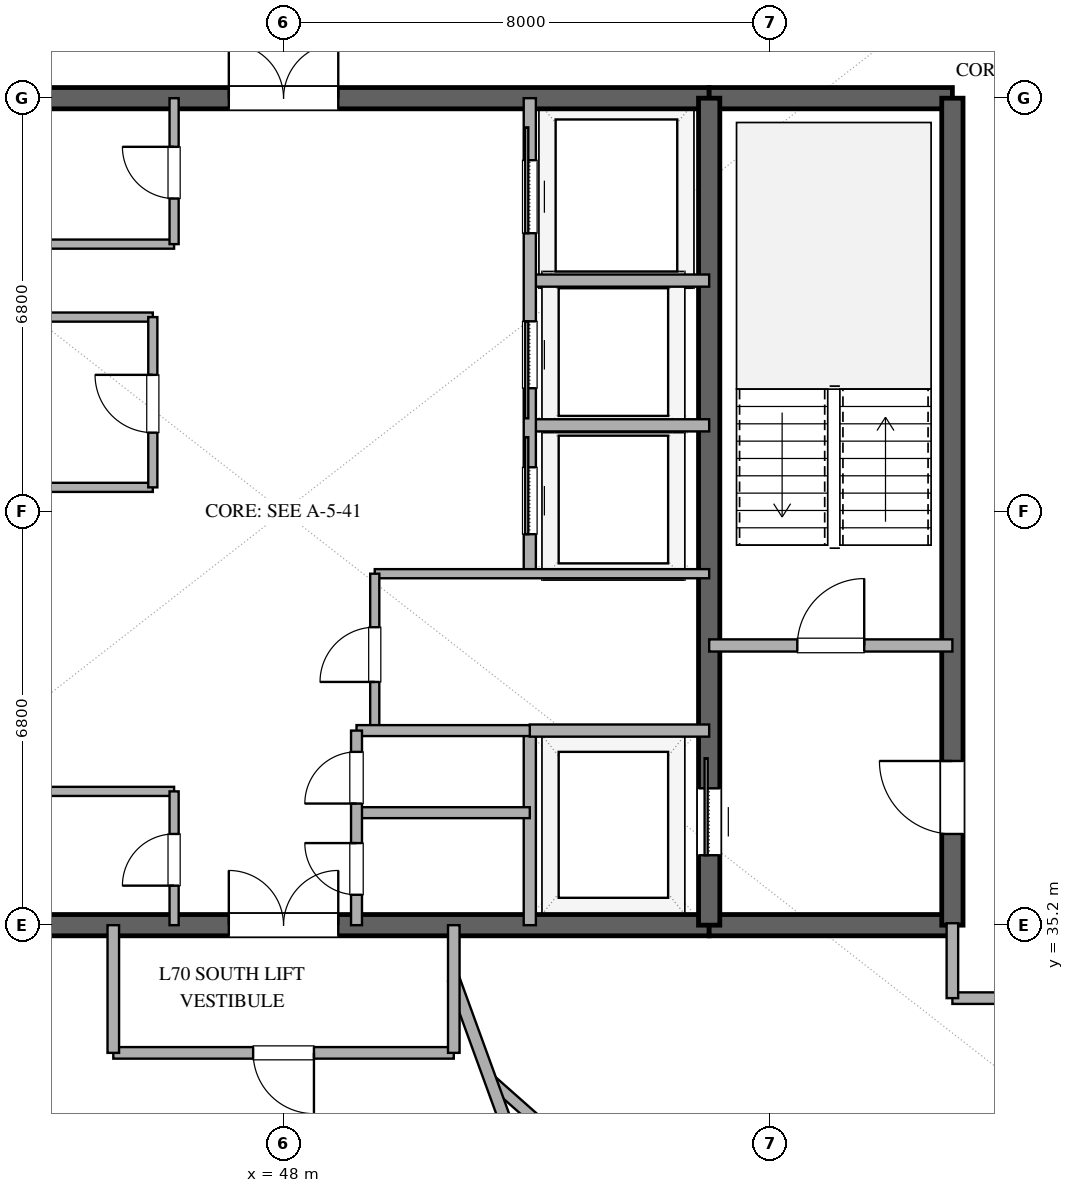
"""IFC4 building model, lengths in metres.
Left out: names, types, materials, properties, quantities, classifications, styles, units other than length and angle.
Written with IfcOpenShell. Run it as: python <this file> out.ifc"""

import sys

from ifc_helpers import new_model, si_unit, direction, frame, frame_2d, origin, place, context, subcontext, project, spatial, rectangle, extrude, element, fill, save


model = new_model("IFC4")
c1 = context("Model", 3, precision=1e-05, world=origin(), true_north=direction((0.0, 1.0)))
c2 = subcontext(c1, "Body", "Model", "MODEL_VIEW")
j1 = project(units=[si_unit("LENGTHUNIT", "METRE"), si_unit("PLANEANGLEUNIT", "RADIAN")], contexts=[c1])
p1 = place(None, origin())
s1 = spatial("IfcSite", under=j1, at=p1, CompositionType="ELEMENT")
p2 = place(p1, origin())
s2 = spatial("IfcBuilding", under=s1, at=p2, CompositionType="ELEMENT")
p3 = place(p2, frame((0.0, 0.0, 273.0)))
s3 = spatial("IfcBuildingStorey", under=s2, at=p3, CompositionType="ELEMENT", Elevation=273.0)
p4 = place(p3, frame((41.0, 35.2, 0.0), z_axis=(0.0, 0.0, 1.0), x_axis=(1.0, 0.0, 0.0)))
e1 = element("IfcWall", 1, at=p4, inside=s3, PredefinedType="SHEAR", context=c2, shape_type="SweptSolid", body=[
    extrude(rectangle(XDim=14.0, YDim=0.35, at=frame_2d((7.0, 0.0))), origin(), (0.0, 0.0, 1.0), 3.37),
])
p5 = place(p4, frame((6.1, 0.0, 0.0)))
e2 = element("IfcOpeningElement", 2, at=p5, cuts=e1, PredefinedType="OPENING", context=c2, shape_type="SweptSolid", body=[
    extrude(rectangle(XDim=1.8, YDim=2.25, at=frame_2d((0.9, 1.125))), frame((0.0, 0.185, 0.0), z_axis=(0.0, -1.0, 0.0), x_axis=(1.0, 0.0, 0.0)), (0.0, 0.0, 1.0), 0.37),
])
p6 = place(p3, frame((55.0, 35.2, 0.0), z_axis=(0.0, 0.0, 1.0), x_axis=(1.0, 0.0, 0.0)))
e3 = element("IfcWall", 3, at=p6, inside=s3, PredefinedType="SHEAR", context=c2, shape_type="SweptSolid", body=[
    extrude(rectangle(XDim=4.0, YDim=0.35, at=frame_2d((2.0, 0.0))), origin(), (0.0, 0.0, 1.0), 3.37),
])
p7 = place(p3, frame((41.0, 48.8, 0.0), z_axis=(0.0, 0.0, 1.0), x_axis=(1.0, 0.0, 0.0)))
e4 = element("IfcWall", 4, at=p7, inside=s3, PredefinedType="SHEAR", context=c2, shape_type="SweptSolid", body=[
    extrude(rectangle(XDim=14.0, YDim=0.35, at=frame_2d((7.0, 0.0))), origin(), (0.0, 0.0, 1.0), 3.37),
])
p8 = place(p7, frame((6.1, 0.0, 0.0)))
e5 = element("IfcOpeningElement", 5, at=p8, cuts=e4, PredefinedType="OPENING", context=c2, shape_type="SweptSolid", body=[
    extrude(rectangle(XDim=1.8, YDim=2.25, at=frame_2d((0.9, 1.125))), frame((0.0, 0.185, 0.0), z_axis=(0.0, -1.0, 0.0), x_axis=(1.0, 0.0, 0.0)), (0.0, 0.0, 1.0), 0.37),
])
p9 = place(p3, frame((55.0, 48.8, 0.0), z_axis=(0.0, 0.0, 1.0), x_axis=(1.0, 0.0, 0.0)))
e6 = element("IfcWall", 6, at=p9, inside=s3, PredefinedType="SHEAR", context=c2, shape_type="SweptSolid", body=[
    extrude(rectangle(XDim=4.0, YDim=0.35, at=frame_2d((2.0, 0.0))), origin(), (0.0, 0.0, 1.0), 3.37),
])
p10 = place(p3, frame((59.0, 35.2, 0.0), z_axis=(0.0, 0.0, 1.0), x_axis=(0.0, 1.0, 0.0)))
e7 = element("IfcWall", 7, at=p10, inside=s3, PredefinedType="SHEAR", context=c2, shape_type="SweptSolid", body=[
    extrude(rectangle(XDim=13.6, YDim=0.35, at=frame_2d((6.8, 0.0))), origin(), (0.0, 0.0, 1.0), 3.37),
])
p11 = place(p10, frame((1.5, 0.0, 0.0)))
e8 = element("IfcOpeningElement", 8, at=p11, cuts=e7, PredefinedType="OPENING", context=c2, shape_type="SweptSolid", body=[
    extrude(rectangle(XDim=1.2, YDim=2.15, at=frame_2d((0.6, 1.075))), frame((0.0, 0.185, 0.0), z_axis=(0.0, -1.0, 0.0), x_axis=(1.0, 0.0, 0.0)), (0.0, 0.0, 1.0), 0.37),
])
p12 = place(p3, frame((55.0, 35.2, 0.0), z_axis=(0.0, 0.0, 1.0), x_axis=(0.0, 1.0, 0.0)))
e9 = element("IfcWall", 9, at=p12, inside=s3, PredefinedType="SHEAR", context=c2, shape_type="SweptSolid", body=[
    extrude(rectangle(XDim=13.6, YDim=0.35, at=frame_2d((6.8, 0.0))), origin(), (0.0, 0.0, 1.0), 3.37),
])
p13 = place(p12, frame((1.15, 0.0, 0.0)))
e10 = element("IfcOpeningElement", 10, at=p13, cuts=e9, PredefinedType="OPENING", context=c2, shape_type="SweptSolid", body=[
    extrude(rectangle(XDim=1.1, YDim=2.2, at=frame_2d((0.55, 1.1))), frame((0.0, 0.185, 0.0), z_axis=(0.0, -1.0, 0.0), x_axis=(1.0, 0.0, 0.0)), (0.0, 0.0, 1.0), 0.37),
])
p14 = place(p3, frame((55.0, 39.8, 0.0), z_axis=(0.0, 0.0, 1.0), x_axis=(1.0, 0.0, 0.0)))
e11 = element("IfcWall", 11, at=p14, inside=s3, PredefinedType="SOLIDWALL", context=c2, shape_type="SweptSolid", body=[
    extrude(rectangle(XDim=4.0, YDim=0.2, at=frame_2d((2.0, 0.0))), origin(), (0.0, 0.0, 1.0), 2.73),
])
p15 = place(p14, frame((1.45, 0.0, 0.0)))
e12 = element("IfcOpeningElement", 12, at=p15, cuts=e11, PredefinedType="OPENING", context=c2, shape_type="SweptSolid", body=[
    extrude(rectangle(XDim=1.1, YDim=2.15, at=frame_2d((0.55, 1.075))), frame((0.0, 0.11, 0.0), z_axis=(0.0, -1.0, 0.0), x_axis=(1.0, 0.0, 0.0)), (0.0, 0.0, 1.0), 0.22),
])
p16 = place(p3, frame((52.05, 35.2, 0.0), z_axis=(0.0, 0.0, 1.0), x_axis=(0.0, 1.0, 0.0)))
e13 = element("IfcWall", 13, at=p16, inside=s3, PredefinedType="SOLIDWALL", context=c2, shape_type="SweptSolid", body=[
    extrude(rectangle(XDim=3.2, YDim=0.2, at=frame_2d((1.6, 0.0))), origin(), (0.0, 0.0, 1.0), 2.73),
])
p17 = place(p3, frame((52.05, 38.4, 0.0), z_axis=(0.0, 0.0, 1.0), x_axis=(1.0, 0.0, 0.0)))
e14 = element("IfcWall", 14, at=p17, inside=s3, PredefinedType="SOLIDWALL", context=c2, shape_type="SweptSolid", body=[
    extrude(rectangle(XDim=2.95, YDim=0.2, at=frame_2d((1.475, 0.0))), origin(), (0.0, 0.0, 1.0), 2.73),
])
for number, where, z_axis, x_axis in (
    (15, (41.0, 42.4, 0.0), (0.0, 0.0, 1.0), (1.0, 0.0, 0.0)),
    (16, (41.0, 45.2, 0.0), (0.0, 0.0, 1.0), (1.0, 0.0, 0.0)),
):
    element("IfcWall", number, at=place(p3, frame(where, z_axis=z_axis, x_axis=x_axis)), inside=s3, PredefinedType="PARTITIONING", context=c2, shape_type="SweptSolid", body=[
        extrude(rectangle(XDim=4.85, YDim=0.15, at=frame_2d((2.425, 0.0))), origin(), (0.0, 0.0, 1.0), 2.73),
    ])
p18 = place(p3, frame((45.85, 42.4, 0.0), z_axis=(0.0, 0.0, 1.0), x_axis=(0.0, 1.0, 0.0)))
e17 = element("IfcWall", 17, at=p18, inside=s3, PredefinedType="PARTITIONING", context=c2, shape_type="SweptSolid", body=[
    extrude(rectangle(XDim=2.8, YDim=0.15, at=frame_2d((1.4, 0.0))), origin(), (0.0, 0.0, 1.0), 2.73),
])
p19 = place(p18, frame((0.9, 0.0, 0.0)))
e18 = element("IfcOpeningElement", 18, at=p19, cuts=e17, PredefinedType="OPENING", context=c2, shape_type="SweptSolid", body=[
    extrude(rectangle(XDim=0.95, YDim=2.15, at=frame_2d((0.475, 1.075))), frame((0.0, 0.085, 0.0), z_axis=(0.0, -1.0, 0.0), x_axis=(1.0, 0.0, 0.0)), (0.0, 0.0, 1.0), 0.17),
])
for number, where, z_axis, x_axis in (
    (19, (52.05, 43.42, 0.0), (0.0, 0.0, 1.0), (1.0, 0.0, 0.0)),
    (20, (52.05, 45.8, 0.0), (0.0, 0.0, 1.0), (1.0, 0.0, 0.0)),
):
    element("IfcWall", number, at=place(p3, frame(where, z_axis=z_axis, x_axis=x_axis)), inside=s3, PredefinedType="SOLIDWALL", context=c2, shape_type="SweptSolid", body=[
        extrude(rectangle(XDim=2.95, YDim=0.2, at=frame_2d((1.475, 0.0))), origin(), (0.0, 0.0, 1.0), 2.73),
    ])
p20 = place(p3, frame((52.05, 40.98, 0.0), z_axis=(0.0, 0.0, 1.0), x_axis=(0.0, 1.0, 0.0)))
e21 = element("IfcWall", 21, at=p20, inside=s3, PredefinedType="SOLIDWALL", context=c2, shape_type="SweptSolid", body=[
    extrude(rectangle(XDim=7.82, YDim=0.2, at=frame_2d((3.91, 0.0))), origin(), (0.0, 0.0, 1.0), 2.73),
])
p21 = place(p20, frame((0.65, 0.0, 0.0)))
e22 = element("IfcOpeningElement", 22, at=p21, cuts=e21, PredefinedType="OPENING", context=c2, shape_type="SweptSolid", body=[
    extrude(rectangle(XDim=1.1, YDim=2.2, at=frame_2d((0.55, 1.1))), frame((0.0, 0.11, 0.0), z_axis=(0.0, -1.0, 0.0), x_axis=(1.0, 0.0, 0.0)), (0.0, 0.0, 1.0), 0.22),
])
p22 = place(p20, frame((3.05, 0.0, 0.0)))
e23 = element("IfcOpeningElement", 23, at=p22, cuts=e21, PredefinedType="OPENING", context=c2, shape_type="SweptSolid", body=[
    extrude(rectangle(XDim=1.1, YDim=2.2, at=frame_2d((0.55, 1.1))), frame((0.0, 0.11, 0.0), z_axis=(0.0, -1.0, 0.0), x_axis=(1.0, 0.0, 0.0)), (0.0, 0.0, 1.0), 0.22),
])
p23 = place(p20, frame((5.6, 0.0, 0.0)))
e24 = element("IfcOpeningElement", 24, at=p23, cuts=e21, PredefinedType="OPENING", context=c2, shape_type="SweptSolid", body=[
    extrude(rectangle(XDim=1.2, YDim=2.2, at=frame_2d((0.6, 1.1))), frame((0.0, 0.11, 0.0), z_axis=(0.0, -1.0, 0.0), x_axis=(1.0, 0.0, 0.0)), (0.0, 0.0, 1.0), 0.22),
])
p24 = place(p3, frame((49.5, 40.98, 0.0), z_axis=(0.0, 0.0, 1.0), x_axis=(1.0, 0.0, 0.0)))
e25 = element("IfcWall", 25, at=p24, inside=s3, PredefinedType="PARTITIONING", context=c2, shape_type="SweptSolid", body=[
    extrude(rectangle(XDim=5.5, YDim=0.15, at=frame_2d((2.75, 0.0))), origin(), (0.0, 0.0, 1.0), 2.73),
])
p25 = place(p3, frame((49.5, 38.4, 0.0), z_axis=(0.0, 0.0, 1.0), x_axis=(0.0, 1.0, 0.0)))
e26 = element("IfcWall", 26, at=p25, inside=s3, PredefinedType="PARTITIONING", context=c2, shape_type="SweptSolid", body=[
    extrude(rectangle(XDim=2.58, YDim=0.15, at=frame_2d((1.29, 0.0))), origin(), (0.0, 0.0, 1.0), 2.73),
])
p26 = place(p25, frame((0.8, 0.0, 0.0)))
e27 = element("IfcOpeningElement", 27, at=p26, cuts=e26, PredefinedType="OPENING", context=c2, shape_type="SweptSolid", body=[
    extrude(rectangle(XDim=0.9, YDim=2.15, at=frame_2d((0.45, 1.075))), frame((0.0, 0.085, 0.0), z_axis=(0.0, -1.0, 0.0), x_axis=(1.0, 0.0, 0.0)), (0.0, 0.0, 1.0), 0.17),
])
p27 = place(p3, frame((43.95, 37.4, 0.0), z_axis=(0.0, 0.0, 1.0), x_axis=(1.0, 0.0, 0.0)))
e28 = element("IfcWall", 28, at=p27, inside=s3, PredefinedType="PARTITIONING", context=c2, shape_type="SweptSolid", body=[
    extrude(rectangle(XDim=2.25, YDim=0.15, at=frame_2d((1.125, 0.0))), origin(), (0.0, 0.0, 1.0), 2.73),
])
p28 = place(p3, frame((46.2, 35.2, 0.0), z_axis=(0.0, 0.0, 1.0), x_axis=(0.0, 1.0, 0.0)))
e29 = element("IfcWall", 29, at=p28, inside=s3, PredefinedType="PARTITIONING", context=c2, shape_type="SweptSolid", body=[
    extrude(rectangle(XDim=2.2, YDim=0.15, at=frame_2d((1.1, 0.0))), origin(), (0.0, 0.0, 1.0), 2.73),
])
p29 = place(p28, frame((0.65, 0.0, 0.0)))
e30 = element("IfcOpeningElement", 30, at=p29, cuts=e29, PredefinedType="OPENING", context=c2, shape_type="SweptSolid", body=[
    extrude(rectangle(XDim=0.85, YDim=2.15, at=frame_2d((0.425, 1.075))), frame((0.0, 0.085, 0.0), z_axis=(0.0, -1.0, 0.0), x_axis=(1.0, 0.0, 0.0)), (0.0, 0.0, 1.0), 0.17),
])
p30 = place(p3, frame((43.95, 46.4, 0.0), z_axis=(0.0, 0.0, 1.0), x_axis=(1.0, 0.0, 0.0)))
e31 = element("IfcWall", 31, at=p30, inside=s3, PredefinedType="PARTITIONING", context=c2, shape_type="SweptSolid", body=[
    extrude(rectangle(XDim=2.25, YDim=0.15, at=frame_2d((1.125, 0.0))), origin(), (0.0, 0.0, 1.0), 2.73),
])
p31 = place(p3, frame((46.2, 46.4, 0.0), z_axis=(0.0, 0.0, 1.0), x_axis=(0.0, 1.0, 0.0)))
e32 = element("IfcWall", 32, at=p31, inside=s3, PredefinedType="PARTITIONING", context=c2, shape_type="SweptSolid", body=[
    extrude(rectangle(XDim=2.4, YDim=0.15, at=frame_2d((1.2, 0.0))), origin(), (0.0, 0.0, 1.0), 2.73),
])
p32 = place(p31, frame((0.75, 0.0, 0.0)))
e33 = element("IfcOpeningElement", 33, at=p32, cuts=e32, PredefinedType="OPENING", context=c2, shape_type="SweptSolid", body=[
    extrude(rectangle(XDim=0.85, YDim=2.15, at=frame_2d((0.425, 1.075))), frame((0.0, 0.085, 0.0), z_axis=(0.0, -1.0, 0.0), x_axis=(1.0, 0.0, 0.0)), (0.0, 0.0, 1.0), 0.17),
])
for number, where, z_axis, x_axis in (
    (34, (49.2, 37.05, 0.0), (0.0, 0.0, 1.0), (1.0, 0.0, 0.0)),
    (35, (49.2, 38.4, 0.0), (0.0, 0.0, 1.0), (1.0, 0.0, 0.0)),
):
    element("IfcWall", number, at=place(p3, frame(where, z_axis=z_axis, x_axis=x_axis)), inside=s3, PredefinedType="PLUMBINGWALL", context=c2, shape_type="SweptSolid", body=[
        extrude(rectangle(XDim=2.85, YDim=0.18, at=frame_2d((1.425, 0.0))), origin(), (0.0, 0.0, 1.0), 2.73),
    ])
p33 = place(p3, frame((49.2, 35.2, 0.0), z_axis=(0.0, 0.0, 1.0), x_axis=(0.0, 1.0, 0.0)))
e36 = element("IfcWall", 36, at=p33, inside=s3, PredefinedType="PLUMBINGWALL", context=c2, shape_type="SweptSolid", body=[
    extrude(rectangle(XDim=3.2, YDim=0.18, at=frame_2d((1.6, 0.0))), origin(), (0.0, 0.0, 1.0), 2.73),
])
p34 = place(p33, frame((0.5, 0.0, 0.0)))
e37 = element("IfcOpeningElement", 37, at=p34, cuts=e36, PredefinedType="OPENING", context=c2, shape_type="SweptSolid", body=[
    extrude(rectangle(XDim=0.85, YDim=2.1, at=frame_2d((0.425, 1.05))), frame((0.0, 0.1, 0.0), z_axis=(0.0, -1.0, 0.0), x_axis=(1.0, 0.0, 0.0)), (0.0, 0.0, 1.0), 0.2),
])
p35 = place(p33, frame((2.0, 0.0, 0.0)))
e38 = element("IfcOpeningElement", 38, at=p35, cuts=e36, PredefinedType="OPENING", context=c2, shape_type="SweptSolid", body=[
    extrude(rectangle(XDim=0.85, YDim=2.15, at=frame_2d((0.425, 1.075))), frame((0.0, 0.1, 0.0), z_axis=(0.0, -1.0, 0.0), x_axis=(1.0, 0.0, 0.0)), (0.0, 0.0, 1.0), 0.2),
])
p36 = place(p3, frame((56.389, 28.246, 0.0), z_axis=(0.0, 0.0, 1.0), x_axis=(-0.749087509224, 0.662471058632, 0.0)))
e39 = element("IfcWall", 39, at=p36, inside=s3, PredefinedType="PLUMBINGWALL", context=c2, shape_type="SweptSolid", body=[
    extrude(rectangle(XDim=6.66, YDim=0.18, at=frame_2d((3.33, 0.0))), origin(), (0.0, 0.0, 1.0), 2.73),
])
p37 = place(p36, frame((2.905, 0.0, 0.0)))
e40 = element("IfcOpeningElement", 40, at=p37, cuts=e39, PredefinedType="OPENING", context=c2, shape_type="SweptSolid", body=[
    extrude(rectangle(XDim=0.85, YDim=2.1, at=frame_2d((0.425, 1.05))), frame((0.0, 0.1, 0.0), z_axis=(0.0, -1.0, 0.0), x_axis=(1.0, 0.0, 0.0)), (0.0, 0.0, 1.0), 0.2),
])
p38 = place(p3, frame((50.8, 33.1, 0.0), z_axis=(0.0, 0.0, 1.0), x_axis=(-1.0, 0.0, 0.0)))
e41 = element("IfcWall", 41, at=p38, inside=s3, PredefinedType="PARTITIONING", context=c2, shape_type="SweptSolid", body=[
    extrude(rectangle(XDim=5.6, YDim=0.19, at=frame_2d((2.8, 0.0))), origin(), (0.0, 0.0, 1.0), 2.73),
])
p39 = place(p38, frame((2.3, 0.0, 0.0)))
e42 = element("IfcOpeningElement", 42, at=p39, cuts=e41, PredefinedType="OPENING", context=c2, shape_type="SweptSolid", body=[
    extrude(rectangle(XDim=1.0, YDim=2.2, at=frame_2d((0.5, 1.1))), frame((0.0, 0.105, 0.0), z_axis=(0.0, -1.0, 0.0), x_axis=(1.0, 0.0, 0.0)), (0.0, 0.0, 1.0), 0.21),
])
p40 = place(p3, frame((50.8, 34.307, 0.0), z_axis=(0.0, 0.0, 1.0), x_axis=(0.342010724278, -0.939696048985, 0.0)))
e43 = element("IfcWall", 43, at=p40, inside=s3, PredefinedType="PARTITIONING", context=c2, shape_type="SweptSolid", body=[
    extrude(rectangle(XDim=8.568, YDim=0.2, at=frame_2d((4.284, 0.0))), origin(), (0.0, 0.0, 1.0), 2.73),
])
p41 = place(p3, frame((61.2, 34.0, 0.0), z_axis=(0.0, 0.0, 1.0), x_axis=(-1.0, 0.0, 0.0)))
e44 = element("IfcWall", 44, at=p41, inside=s3, PredefinedType="PARTITIONING", context=c2, shape_type="SweptSolid", body=[
    extrude(rectangle(XDim=2.2, YDim=0.19, at=frame_2d((1.1, 0.0))), origin(), (0.0, 0.0, 1.0), 2.73),
])
for number, where, z_axis, x_axis in (
    (45, (45.2, 33.1, 0.0), (0.0, 0.0, 1.0), (0.0, 1.0, 0.0)),
    (46, (50.8, 35.2, 0.0), (0.0, 0.0, 1.0), (0.0, -1.0, 0.0)),
):
    element("IfcWall", number, at=place(p3, frame(where, z_axis=z_axis, x_axis=x_axis)), inside=s3, PredefinedType="PARTITIONING", context=c2, shape_type="SweptSolid", body=[
        extrude(rectangle(XDim=2.1, YDim=0.19, at=frame_2d((1.05, 0.0))), origin(), (0.0, 0.0, 1.0), 2.73),
    ])
p42 = place(p3, frame((59.0, 34.0, 0.0), z_axis=(0.0, 0.0, 1.0), x_axis=(0.0, 1.0, 0.0)))
e47 = element("IfcWall", 47, at=p42, inside=s3, PredefinedType="PARTITIONING", context=c2, shape_type="SweptSolid", body=[
    extrude(rectangle(XDim=1.232, YDim=0.19, at=frame_2d((0.616, 0.0))), origin(), (0.0, 0.0, 1.0), 2.73),
])
p43 = place(p13, origin())
e48 = element("IfcDoor", 48, at=p43, inside=s3, OperationType="SLIDING_TO_RIGHT", PredefinedType="DOOR", context=c2, shape_type="SweptSolid", body=[
    extrude(rectangle(XDim=1.1, YDim=2.2, at=frame_2d((0.55, 1.1))), frame((0.0, 0.025, 0.0), z_axis=(0.0, -1.0, 0.0), x_axis=(1.0, 0.0, 0.0)), (0.0, 0.0, 1.0), 0.05),
])
fill(e10, e48)
p44 = place(p11, origin())
e49 = element("IfcDoor", 49, at=p44, inside=s3, OperationType="SINGLE_SWING_RIGHT", PredefinedType="DOOR", context=c2, shape_type="SweptSolid", body=[
    extrude(rectangle(XDim=1.2, YDim=2.15, at=frame_2d((0.6, 1.075))), frame((0.0, 0.025, 0.0), z_axis=(0.0, -1.0, 0.0), x_axis=(1.0, 0.0, 0.0)), (0.0, 0.0, 1.0), 0.05),
])
fill(e8, e49)
p45 = place(p5, origin())
e50 = element("IfcDoor", 50, at=p45, inside=s3, OperationType="DOUBLE_DOOR_SINGLE_SWING", PredefinedType="DOOR", context=c2, shape_type="SweptSolid", body=[
    extrude(rectangle(XDim=1.8, YDim=2.25, at=frame_2d((0.9, 1.125))), frame((0.0, 0.025, 0.0), z_axis=(0.0, -1.0, 0.0), x_axis=(1.0, 0.0, 0.0)), (0.0, 0.0, 1.0), 0.05),
])
fill(e2, e50)
p46 = place(p8, origin())
e51 = element("IfcDoor", 51, at=p46, inside=s3, OperationType="DOUBLE_DOOR_SINGLE_SWING", PredefinedType="DOOR", context=c2, shape_type="SweptSolid", body=[
    extrude(rectangle(XDim=1.8, YDim=2.25, at=frame_2d((0.9, 1.125))), frame((0.0, 0.025, 0.0), z_axis=(0.0, -1.0, 0.0), x_axis=(1.0, 0.0, 0.0)), (0.0, 0.0, 1.0), 0.05),
])
fill(e5, e51)
p47 = place(p15, origin())
e52 = element("IfcDoor", 52, at=p47, inside=s3, OperationType="SINGLE_SWING_RIGHT", PredefinedType="DOOR", context=c2, shape_type="SweptSolid", body=[
    extrude(rectangle(XDim=1.1, YDim=2.15, at=frame_2d((0.55, 1.075))), frame((0.0, 0.025, 0.0), z_axis=(0.0, -1.0, 0.0), x_axis=(1.0, 0.0, 0.0)), (0.0, 0.0, 1.0), 0.05),
])
fill(e12, e52)
p48 = place(p19, origin())
e53 = element("IfcDoor", 53, at=p48, inside=s3, OperationType="SINGLE_SWING_RIGHT", PredefinedType="DOOR", context=c2, shape_type="SweptSolid", body=[
    extrude(rectangle(XDim=0.95, YDim=2.15, at=frame_2d((0.475, 1.075))), frame((0.0, 0.025, 0.0), z_axis=(0.0, -1.0, 0.0), x_axis=(1.0, 0.0, 0.0)), (0.0, 0.0, 1.0), 0.05),
])
fill(e18, e53)
p49 = place(p21, origin())
e54 = element("IfcDoor", 54, at=p49, inside=s3, OperationType="SLIDING_TO_RIGHT", PredefinedType="DOOR", context=c2, shape_type="SweptSolid", body=[
    extrude(rectangle(XDim=1.1, YDim=2.2, at=frame_2d((0.55, 1.1))), frame((0.0, 0.025, 0.0), z_axis=(0.0, -1.0, 0.0), x_axis=(1.0, 0.0, 0.0)), (0.0, 0.0, 1.0), 0.05),
])
fill(e22, e54)
p50 = place(p22, origin())
e55 = element("IfcDoor", 55, at=p50, inside=s3, OperationType="SLIDING_TO_LEFT", PredefinedType="DOOR", context=c2, shape_type="SweptSolid", body=[
    extrude(rectangle(XDim=1.1, YDim=2.2, at=frame_2d((0.55, 1.1))), frame((0.0, 0.025, 0.0), z_axis=(0.0, -1.0, 0.0), x_axis=(1.0, 0.0, 0.0)), (0.0, 0.0, 1.0), 0.05),
])
fill(e23, e55)
p51 = place(p23, origin())
e56 = element("IfcDoor", 56, at=p51, inside=s3, OperationType="SLIDING_TO_RIGHT", PredefinedType="DOOR", context=c2, shape_type="SweptSolid", body=[
    extrude(rectangle(XDim=1.2, YDim=2.2, at=frame_2d((0.6, 1.1))), frame((0.0, 0.025, 0.0), z_axis=(0.0, -1.0, 0.0), x_axis=(1.0, 0.0, 0.0)), (0.0, 0.0, 1.0), 0.05),
])
fill(e24, e56)
p52 = place(p26, origin())
e57 = element("IfcDoor", 57, at=p52, inside=s3, OperationType="SINGLE_SWING_LEFT", PredefinedType="DOOR", context=c2, shape_type="SweptSolid", body=[
    extrude(rectangle(XDim=0.9, YDim=2.15, at=frame_2d((0.45, 1.075))), frame((0.0, 0.025, 0.0), z_axis=(0.0, -1.0, 0.0), x_axis=(1.0, 0.0, 0.0)), (0.0, 0.0, 1.0), 0.05),
])
fill(e27, e57)
p53 = place(p29, origin())
e58 = element("IfcDoor", 58, at=p53, inside=s3, OperationType="SINGLE_SWING_LEFT", PredefinedType="DOOR", context=c2, shape_type="SweptSolid", body=[
    extrude(rectangle(XDim=0.85, YDim=2.15, at=frame_2d((0.425, 1.075))), frame((0.0, 0.025, 0.0), z_axis=(0.0, -1.0, 0.0), x_axis=(1.0, 0.0, 0.0)), (0.0, 0.0, 1.0), 0.05),
])
fill(e30, e58)
p54 = place(p32, origin())
e59 = element("IfcDoor", 59, at=p54, inside=s3, OperationType="SINGLE_SWING_RIGHT", PredefinedType="DOOR", context=c2, shape_type="SweptSolid", body=[
    extrude(rectangle(XDim=0.85, YDim=2.15, at=frame_2d((0.425, 1.075))), frame((0.0, 0.025, 0.0), z_axis=(0.0, -1.0, 0.0), x_axis=(1.0, 0.0, 0.0)), (0.0, 0.0, 1.0), 0.05),
])
fill(e33, e59)
p55 = place(p34, origin())
e60 = element("IfcDoor", 60, at=p55, inside=s3, OperationType="SINGLE_SWING_RIGHT", PredefinedType="DOOR", context=c2, shape_type="SweptSolid", body=[
    extrude(rectangle(XDim=0.85, YDim=2.1, at=frame_2d((0.425, 1.05))), frame((0.0, 0.025, 0.0), z_axis=(0.0, -1.0, 0.0), x_axis=(1.0, 0.0, 0.0)), (0.0, 0.0, 1.0), 0.05),
])
fill(e37, e60)
p56 = place(p35, origin())
e61 = element("IfcDoor", 61, at=p56, inside=s3, OperationType="SINGLE_SWING_LEFT", PredefinedType="DOOR", context=c2, shape_type="SweptSolid", body=[
    extrude(rectangle(XDim=0.85, YDim=2.15, at=frame_2d((0.425, 1.075))), frame((0.0, 0.025, 0.0), z_axis=(0.0, -1.0, 0.0), x_axis=(1.0, 0.0, 0.0)), (0.0, 0.0, 1.0), 0.05),
])
fill(e38, e61)
p57 = place(p39, origin())
e62 = element("IfcDoor", 62, at=p57, inside=s3, OperationType="SINGLE_SWING_LEFT", PredefinedType="DOOR", context=c2, shape_type="SweptSolid", body=[
    extrude(rectangle(XDim=1.0, YDim=2.2, at=frame_2d((0.5, 1.1))), frame((0.0, 0.025, 0.0), z_axis=(0.0, -1.0, 0.0), x_axis=(1.0, 0.0, 0.0)), (0.0, 0.0, 1.0), 0.05),
])
fill(e42, e62)
save(model, sys.argv[1])
